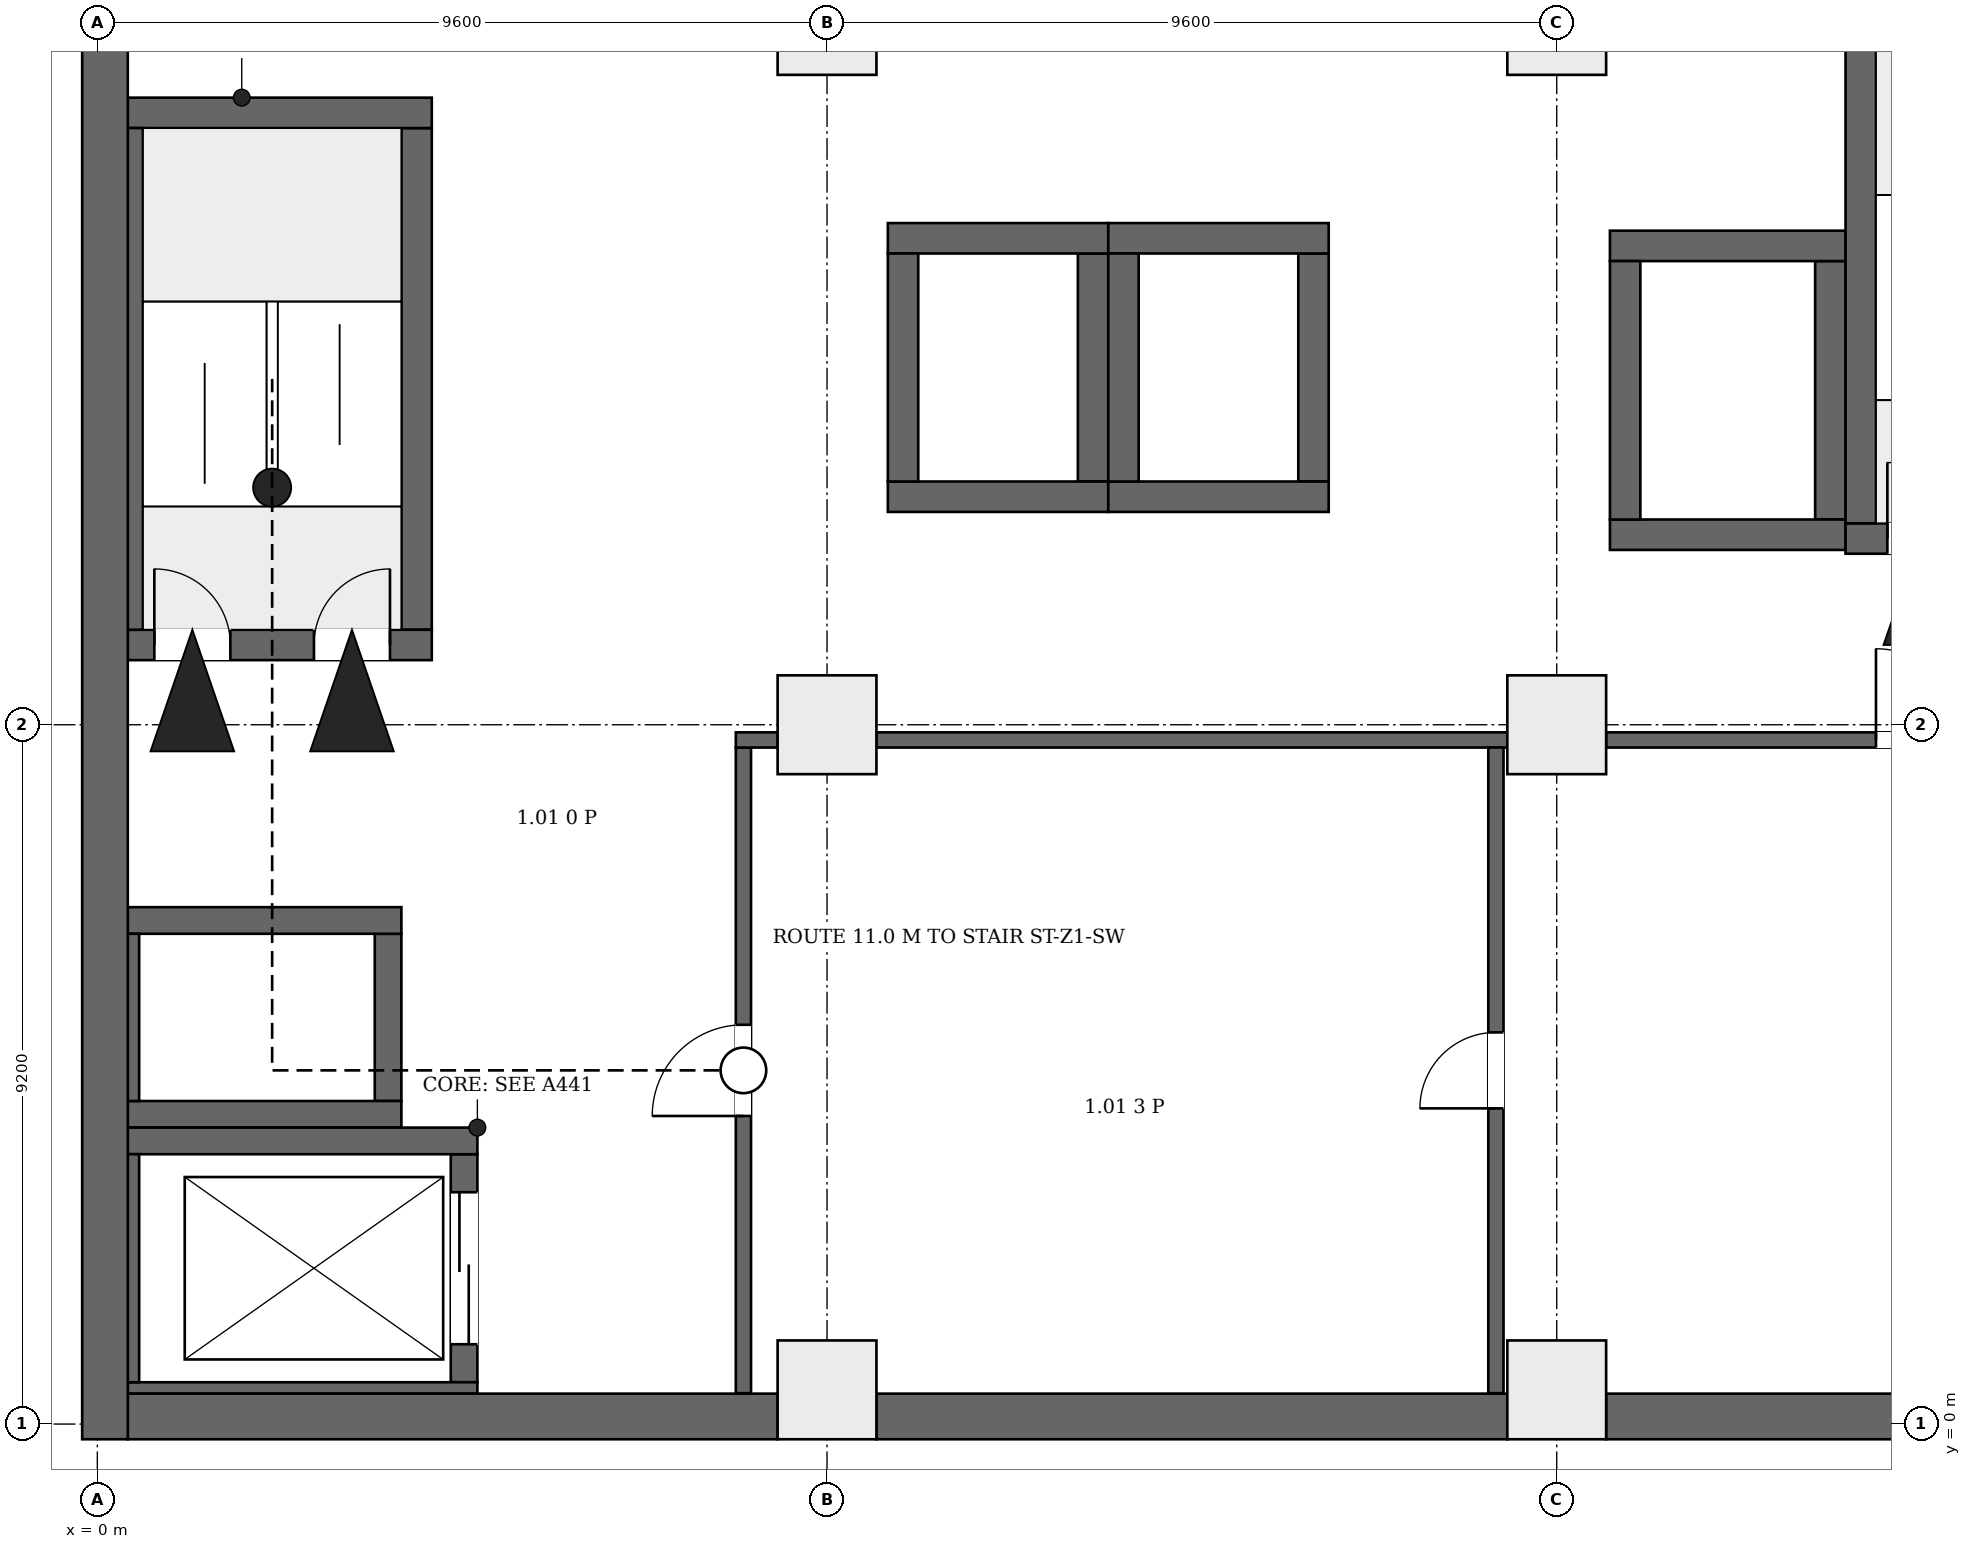
"""IFC4 building model, lengths in metres.
Left out: names, types, materials, properties, quantities, classifications, styles, units other than length and angle.
Written with IfcOpenShell. Run it as: python <this file> out.ifc"""

import sys

from ifc_helpers import new_model, si_unit, direction, frame, frame_2d, origin, origin_2d, place, context, subcontext, project, spatial, rectangle, extrude, element, fill, save


model = new_model("IFC4")
c1 = context("Model", 3, precision=1e-05, world=origin(), true_north=direction((0.0, 1.0)))
c2 = subcontext(c1, "Body", "Model", "MODEL_VIEW")
j1 = project(units=[si_unit("LENGTHUNIT", "METRE"), si_unit("PLANEANGLEUNIT", "RADIAN")], contexts=[c1])
p1 = place(None, origin())
s1 = spatial("IfcSite", under=j1, at=p1, CompositionType="ELEMENT")
p2 = place(p1, origin())
s2 = spatial("IfcBuilding", under=s1, at=p2, CompositionType="ELEMENT")
p3 = place(p2, frame((0.0, 0.0, -5.5)))
s3 = spatial("IfcBuildingStorey", under=s2, at=p3, CompositionType="ELEMENT", Elevation=-5.5)
p4 = place(p3, frame((0.101, -0.2, 0.0), z_axis=(0.0, 0.0, 1.0), x_axis=(0.0, 1.0, 0.0)))
e1 = element("IfcWall", 1, at=p4, inside=s3, PredefinedType="SOLIDWALL", context=c2, shape_type="SweptSolid", body=[
    extrude(rectangle(XDim=46.88, YDim=0.6, at=frame_2d((23.44, 0.0))), origin(), (0.0, 0.0, 1.0), 5.5),
])
p5 = place(p3, frame((0.4, 0.1, 0.0), z_axis=(0.0, 0.0, 1.0), x_axis=(1.0, 0.0, 0.0)))
e2 = element("IfcWall", 2, at=p5, inside=s3, PredefinedType="SOLIDWALL", context=c2, shape_type="SweptSolid", body=[
    extrude(rectangle(XDim=8.55, YDim=0.6, at=frame_2d((4.275, 0.0))), origin(), (0.0, 0.0, 1.0), 5.5),
])
p6 = place(p3, frame((10.25, 0.1, 0.0), z_axis=(0.0, 0.0, 1.0), x_axis=(1.0, 0.0, 0.0)))
e3 = element("IfcWall", 3, at=p6, inside=s3, PredefinedType="SOLIDWALL", context=c2, shape_type="SweptSolid", body=[
    extrude(rectangle(XDim=8.3, YDim=0.6, at=frame_2d((4.15, 0.0))), origin(), (0.0, 0.0, 1.0), 5.5),
])
p7 = place(p3, frame((19.85, 0.1, 0.0), z_axis=(0.0, 0.0, 1.0), x_axis=(1.0, 0.0, 0.0)))
e4 = element("IfcWall", 4, at=p7, inside=s3, PredefinedType="SOLIDWALL", context=c2, shape_type="SweptSolid", body=[
    extrude(rectangle(XDim=8.3, YDim=0.6, at=frame_2d((4.15, 0.0))), origin(), (0.0, 0.0, 1.0), 5.5),
])
p8 = place(p3, frame((0.4, 10.25, 0.0), z_axis=(0.0, 0.0, 1.0), x_axis=(1.0, 0.0, 0.0)))
e5 = element("IfcWall", 5, at=p8, inside=s3, PredefinedType="SHEAR", context=c2, shape_type="SweptSolid", body=[
    extrude(rectangle(XDim=4.0, YDim=0.4, at=frame_2d((2.0, 0.0))), origin(), (0.0, 0.0, 1.0), 5.5),
])
p9 = place(p8, frame((0.35, 0.0, 0.0)))
e6 = element("IfcOpeningElement", 6, at=p9, cuts=e5, PredefinedType="OPENING", context=c2, shape_type="SweptSolid", body=[
    extrude(rectangle(XDim=1.0, YDim=2.1, at=frame_2d((0.5, 1.05))), frame((0.0, 0.21, 0.0), z_axis=(0.0, -1.0, 0.0), x_axis=(1.0, 0.0, 0.0)), (0.0, 0.0, 1.0), 0.42),
])
p10 = place(p8, frame((2.45, 0.0, 0.0)))
e7 = element("IfcOpeningElement", 7, at=p10, cuts=e5, PredefinedType="OPENING", context=c2, shape_type="SweptSolid", body=[
    extrude(rectangle(XDim=1.0, YDim=2.1, at=frame_2d((0.5, 1.05))), frame((0.0, 0.21, 0.0), z_axis=(0.0, -1.0, 0.0), x_axis=(1.0, 0.0, 0.0)), (0.0, 0.0, 1.0), 0.42),
])
p11 = place(p3, frame((0.4, 17.25, 0.0), z_axis=(0.0, 0.0, 1.0), x_axis=(1.0, 0.0, 0.0)))
e8 = element("IfcWall", 8, at=p11, inside=s3, PredefinedType="SHEAR", context=c2, shape_type="SweptSolid", body=[
    extrude(rectangle(XDim=4.0, YDim=0.4, at=frame_2d((2.0, 0.0))), origin(), (0.0, 0.0, 1.0), 5.5),
])
p12 = place(p3, frame((0.5, 10.45, 0.0), z_axis=(0.0, 0.0, 1.0), x_axis=(0.0, 1.0, 0.0)))
e9 = element("IfcWall", 9, at=p12, inside=s3, PredefinedType="SHEAR", context=c2, shape_type="SweptSolid", body=[
    extrude(rectangle(XDim=6.6, YDim=0.2, at=frame_2d((3.3, 0.0))), origin(), (0.0, 0.0, 1.0), 5.5),
])
p13 = place(p3, frame((4.2, 10.45, 0.0), z_axis=(0.0, 0.0, 1.0), x_axis=(0.0, 1.0, 0.0)))
e10 = element("IfcWall", 10, at=p13, inside=s3, PredefinedType="SHEAR", context=c2, shape_type="SweptSolid", body=[
    extrude(rectangle(XDim=6.6, YDim=0.4, at=frame_2d((3.3, 0.0))), origin(), (0.0, 0.0, 1.0), 5.5),
])
p14 = place(p3, frame((23.0, 11.65, 0.0), z_axis=(0.0, 0.0, 1.0), x_axis=(1.0, 0.0, 0.0)))
e11 = element("IfcWall", 11, at=p14, inside=s3, PredefinedType="SHEAR", context=c2, shape_type="SweptSolid", body=[
    extrude(rectangle(XDim=4.2, YDim=0.4, at=frame_2d((2.1, 0.0))), origin(), (0.0, 0.0, 1.0), 5.5),
])
p15 = place(p14, frame((0.55, 0.0, 0.0)))
e12 = element("IfcOpeningElement", 12, at=p15, cuts=e11, PredefinedType="OPENING", context=c2, shape_type="SweptSolid", body=[
    extrude(rectangle(XDim=1.0, YDim=2.1, at=frame_2d((0.5, 1.05))), frame((0.0, 0.21, 0.0), z_axis=(0.0, -1.0, 0.0), x_axis=(1.0, 0.0, 0.0)), (0.0, 0.0, 1.0), 0.42),
])
p16 = place(p14, frame((2.65, 0.0, 0.0)))
e13 = element("IfcOpeningElement", 13, at=p16, cuts=e11, PredefinedType="OPENING", context=c2, shape_type="SweptSolid", body=[
    extrude(rectangle(XDim=1.0, YDim=2.1, at=frame_2d((0.5, 1.05))), frame((0.0, 0.21, 0.0), z_axis=(0.0, -1.0, 0.0), x_axis=(1.0, 0.0, 0.0)), (0.0, 0.0, 1.0), 0.42),
])
p17 = place(p3, frame((23.2, 11.85, 0.0), z_axis=(0.0, 0.0, 1.0), x_axis=(0.0, 1.0, 0.0)))
e14 = element("IfcWall", 14, at=p17, inside=s3, PredefinedType="SHEAR", context=c2, shape_type="SweptSolid", body=[
    extrude(rectangle(XDim=6.6, YDim=0.4, at=frame_2d((3.3, 0.0))), origin(), (0.0, 0.0, 1.0), 5.5),
])
p18 = place(p3, frame((0.4, 0.475, -1.6), z_axis=(0.0, 0.0, 1.0), x_axis=(1.0, 0.0, 0.0)))
e15 = element("IfcWall", 15, at=p18, inside=s3, PredefinedType="SHEAR", context=c2, shape_type="SweptSolid", body=[
    extrude(rectangle(XDim=4.6, YDim=0.15, at=frame_2d((2.3, 0.0))), origin(), (0.0, 0.0, 1.0), 7.1),
])
p19 = place(p3, frame((0.4, 3.725, -1.6), z_axis=(0.0, 0.0, 1.0), x_axis=(1.0, 0.0, 0.0)))
e16 = element("IfcWall", 16, at=p19, inside=s3, PredefinedType="SHEAR", context=c2, shape_type="SweptSolid", body=[
    extrude(rectangle(XDim=4.6, YDim=0.35, at=frame_2d((2.3, 0.0))), origin(), (0.0, 0.0, 1.0), 7.1),
])
p20 = place(p3, frame((0.475, 0.55, -1.6), z_axis=(0.0, 0.0, 1.0), x_axis=(0.0, 1.0, 0.0)))
e17 = element("IfcWall", 17, at=p20, inside=s3, PredefinedType="SHEAR", context=c2, shape_type="SweptSolid", body=[
    extrude(rectangle(XDim=3.0, YDim=0.15, at=frame_2d((1.5, 0.0))), origin(), (0.0, 0.0, 1.0), 7.1),
])
p21 = place(p3, frame((4.825, 0.55, -1.6), z_axis=(0.0, 0.0, 1.0), x_axis=(0.0, 1.0, 0.0)))
e18 = element("IfcWall", 18, at=p21, inside=s3, PredefinedType="SHEAR", context=c2, shape_type="SweptSolid", body=[
    extrude(rectangle(XDim=3.0, YDim=0.35, at=frame_2d((1.5, 0.0))), origin(), (0.0, 0.0, 1.0), 7.1),
])
p22 = place(p21, frame((0.5, 0.0, 1.6)))
e19 = element("IfcOpeningElement", 19, at=p22, cuts=e18, PredefinedType="OPENING", context=c2, shape_type="SweptSolid", body=[
    extrude(rectangle(XDim=2.0, YDim=2.4, at=frame_2d((1.0, 1.2))), frame((0.0, 0.185, 0.0), z_axis=(0.0, -1.0, 0.0), x_axis=(1.0, 0.0, 0.0)), (0.0, 0.0, 1.0), 0.37),
])
for number, where, z_axis, x_axis in (
    (20, (0.4, 4.075, 0.0), (0.0, 0.0, 1.0), (1.0, 0.0, 0.0)),
    (21, (0.4, 6.625, 0.0), (0.0, 0.0, 1.0), (1.0, 0.0, 0.0)),
):
    element("IfcWall", number, at=place(p3, frame(where, z_axis=z_axis, x_axis=x_axis)), inside=s3, PredefinedType="SHEAR", context=c2, shape_type="SweptSolid", body=[
        extrude(rectangle(XDim=3.6, YDim=0.35, at=frame_2d((1.8, 0.0))), origin(), (0.0, 0.0, 1.0), 5.5),
    ])
p23 = place(p3, frame((0.475, 4.25, 0.0), z_axis=(0.0, 0.0, 1.0), x_axis=(0.0, 1.0, 0.0)))
e22 = element("IfcWall", 22, at=p23, inside=s3, PredefinedType="SHEAR", context=c2, shape_type="SweptSolid", body=[
    extrude(rectangle(XDim=2.2, YDim=0.15, at=frame_2d((1.1, 0.0))), origin(), (0.0, 0.0, 1.0), 5.5),
])
p24 = place(p3, frame((3.825, 4.25, 0.0), z_axis=(0.0, 0.0, 1.0), x_axis=(0.0, 1.0, 0.0)))
e23 = element("IfcWall", 23, at=p24, inside=s3, PredefinedType="SHEAR", context=c2, shape_type="SweptSolid", body=[
    extrude(rectangle(XDim=2.2, YDim=0.35, at=frame_2d((1.1, 0.0))), origin(), (0.0, 0.0, 1.0), 5.5),
])
for number, where, z_axis, x_axis in (
    (24, (10.4, 12.2, 0.0), (0.0, 0.0, 1.0), (1.0, 0.0, 0.0)),
    (25, (10.4, 15.6, 0.0), (0.0, 0.0, 1.0), (1.0, 0.0, 0.0)),
):
    element("IfcWall", number, at=place(p3, frame(where, z_axis=z_axis, x_axis=x_axis)), inside=s3, PredefinedType="SHEAR", context=c2, shape_type="SweptSolid", body=[
        extrude(rectangle(XDim=2.9, YDim=0.4, at=frame_2d((1.45, 0.0))), origin(), (0.0, 0.0, 1.0), 5.5),
    ])
for number, where, z_axis, x_axis in (
    (26, (10.6, 12.4, 0.0), (0.0, 0.0, 1.0), (0.0, 1.0, 0.0)),
    (27, (13.1, 12.4, 0.0), (0.0, 0.0, 1.0), (0.0, 1.0, 0.0)),
):
    element("IfcWall", number, at=place(p3, frame(where, z_axis=z_axis, x_axis=x_axis)), inside=s3, PredefinedType="SHEAR", context=c2, shape_type="SweptSolid", body=[
        extrude(rectangle(XDim=3.0, YDim=0.4, at=frame_2d((1.5, 0.0))), origin(), (0.0, 0.0, 1.0), 5.5),
    ])
for number, where, z_axis, x_axis in (
    (28, (13.3, 12.2, 0.0), (0.0, 0.0, 1.0), (1.0, 0.0, 0.0)),
    (29, (13.3, 15.6, 0.0), (0.0, 0.0, 1.0), (1.0, 0.0, 0.0)),
):
    element("IfcWall", number, at=place(p3, frame(where, z_axis=z_axis, x_axis=x_axis)), inside=s3, PredefinedType="SHEAR", context=c2, shape_type="SweptSolid", body=[
        extrude(rectangle(XDim=2.9, YDim=0.4, at=frame_2d((1.45, 0.0))), origin(), (0.0, 0.0, 1.0), 5.5),
    ])
for number, where, z_axis, x_axis in (
    (30, (13.5, 12.4, 0.0), (0.0, 0.0, 1.0), (0.0, 1.0, 0.0)),
    (31, (16.0, 12.4, 0.0), (0.0, 0.0, 1.0), (0.0, 1.0, 0.0)),
):
    element("IfcWall", number, at=place(p3, frame(where, z_axis=z_axis, x_axis=x_axis)), inside=s3, PredefinedType="SHEAR", context=c2, shape_type="SweptSolid", body=[
        extrude(rectangle(XDim=3.0, YDim=0.4, at=frame_2d((1.5, 0.0))), origin(), (0.0, 0.0, 1.0), 5.5),
    ])
for number, where, z_axis, x_axis in (
    (32, (19.9, 11.7, 0.0), (0.0, 0.0, 1.0), (1.0, 0.0, 0.0)),
    (33, (19.9, 15.5, 0.0), (0.0, 0.0, 1.0), (1.0, 0.0, 0.0)),
):
    element("IfcWall", number, at=place(p3, frame(where, z_axis=z_axis, x_axis=x_axis)), inside=s3, PredefinedType="SHEAR", context=c2, shape_type="SweptSolid", body=[
        extrude(rectangle(XDim=3.1, YDim=0.4, at=frame_2d((1.55, 0.0))), origin(), (0.0, 0.0, 1.0), 5.5),
    ])
for number, where, z_axis, x_axis in (
    (34, (20.1, 11.9, 0.0), (0.0, 0.0, 1.0), (0.0, 1.0, 0.0)),
    (35, (22.8, 11.9, 0.0), (0.0, 0.0, 1.0), (0.0, 1.0, 0.0)),
):
    element("IfcWall", number, at=place(p3, frame(where, z_axis=z_axis, x_axis=x_axis)), inside=s3, PredefinedType="SHEAR", context=c2, shape_type="SweptSolid", body=[
        extrude(rectangle(XDim=3.4, YDim=0.4, at=frame_2d((1.7, 0.0))), origin(), (0.0, 0.0, 1.0), 5.5),
    ])
for number, where, z_axis, x_axis in (
    (36, (9.6, 0.45, 0.0), (0.0, 0.0, 1.0), (1.0, 0.0, 0.0)),
    (37, (19.2, 0.45, 0.0), (0.0, 0.0, 1.0), (1.0, 0.0, 0.0)),
    (38, (9.6, 9.2, 0.0), (0.0, 0.0, 1.0), (1.0, 0.0, 0.0)),
    (39, (19.2, 9.2, 0.0), (0.0, 0.0, 1.0), (1.0, 0.0, 0.0)),
    (40, (9.6, 18.4, 0.0), (0.0, 0.0, 1.0), (1.0, 0.0, 0.0)),
    (41, (19.2, 18.4, 0.0), (0.0, 0.0, 1.0), (1.0, 0.0, 0.0)),
):
    element("IfcColumn", number, at=place(p3, frame(where, z_axis=z_axis, x_axis=x_axis)), inside=s3, PredefinedType="COLUMN", context=c2, shape_type="SweptSolid", body=[
        extrude(rectangle(XDim=1.3, YDim=1.3, at=origin_2d()), origin(), (0.0, 0.0, 1.0), 5.5),
    ])
p25 = place(p3, frame((8.5, 0.406, 0.0), z_axis=(0.0, 0.0, 1.0), x_axis=(0.0, 1.0, 0.0)))
e42 = element("IfcWall", 42, at=p25, inside=s3, PredefinedType="PARTITIONING", context=c2, shape_type="SweptSolid", body=[
    extrude(rectangle(XDim=8.494, YDim=0.2, at=frame_2d((4.247, 0.0))), origin(), (0.0, 0.0, 1.0), 5.15),
])
p26 = place(p25, frame((3.647, 0.0, 0.0)))
e43 = element("IfcOpeningElement", 43, at=p26, cuts=e42, PredefinedType="OPENING", context=c2, shape_type="SweptSolid", body=[
    extrude(rectangle(XDim=1.2, YDim=2.1, at=frame_2d((0.6, 1.05))), frame((0.0, 0.11, 0.0), z_axis=(0.0, -1.0, 0.0), x_axis=(1.0, 0.0, 0.0)), (0.0, 0.0, 1.0), 0.22),
])
p27 = place(p3, frame((8.4, 9.0, 0.0), z_axis=(0.0, 0.0, 1.0), x_axis=(1.0, 0.0, 0.0)))
e44 = element("IfcWall", 44, at=p27, inside=s3, PredefinedType="PARTITIONING", context=c2, shape_type="SweptSolid", body=[
    extrude(rectangle(XDim=0.55, YDim=0.2, at=frame_2d((0.275, 0.0))), origin(), (0.0, 0.0, 1.0), 5.15),
])
p28 = place(p3, frame((10.25, 9.0, 0.0), z_axis=(0.0, 0.0, 1.0), x_axis=(1.0, 0.0, 0.0)))
e45 = element("IfcWall", 45, at=p28, inside=s3, PredefinedType="PARTITIONING", context=c2, shape_type="SweptSolid", body=[
    extrude(rectangle(XDim=8.3, YDim=0.2, at=frame_2d((4.15, 0.0))), origin(), (0.0, 0.0, 1.0), 5.15),
])
p29 = place(p3, frame((18.4, 0.406, 0.0), z_axis=(0.0, 0.0, 1.0), x_axis=(0.0, 1.0, 0.0)))
e46 = element("IfcWall", 46, at=p29, inside=s3, PredefinedType="PARTITIONING", context=c2, shape_type="SweptSolid", body=[
    extrude(rectangle(XDim=8.494, YDim=0.2, at=frame_2d((4.247, 0.0))), origin(), (0.0, 0.0, 1.0), 5.15),
])
p30 = place(p29, frame((3.747, 0.0, 0.0)))
e47 = element("IfcOpeningElement", 47, at=p30, cuts=e46, PredefinedType="OPENING", context=c2, shape_type="SweptSolid", body=[
    extrude(rectangle(XDim=1.0, YDim=2.1, at=frame_2d((0.5, 1.05))), frame((0.0, 0.11, 0.0), z_axis=(0.0, -1.0, 0.0), x_axis=(1.0, 0.0, 0.0)), (0.0, 0.0, 1.0), 0.22),
])
p31 = place(p3, frame((19.85, 9.0, 0.0), z_axis=(0.0, 0.0, 1.0), x_axis=(1.0, 0.0, 0.0)))
e48 = element("IfcWall", 48, at=p31, inside=s3, PredefinedType="PARTITIONING", context=c2, shape_type="SweptSolid", body=[
    extrude(rectangle(XDim=8.3, YDim=0.2, at=frame_2d((4.15, 0.0))), origin(), (0.0, 0.0, 1.0), 5.15),
])
p32 = place(p31, frame((3.55, 0.0, 0.0)))
e49 = element("IfcOpeningElement", 49, at=p32, cuts=e48, PredefinedType="OPENING", context=c2, shape_type="SweptSolid", body=[
    extrude(rectangle(XDim=1.2, YDim=2.1, at=frame_2d((0.6, 1.05))), frame((0.0, 0.11, 0.0), z_axis=(0.0, -1.0, 0.0), x_axis=(1.0, 0.0, 0.0)), (0.0, 0.0, 1.0), 0.22),
])
p33 = place(p9, origin())
e50 = element("IfcDoor", 50, at=p33, inside=s3, OperationType="SINGLE_SWING_RIGHT", PredefinedType="DOOR", context=c2, shape_type="SweptSolid", body=[
    extrude(rectangle(XDim=1.0, YDim=2.1, at=frame_2d((0.5, 1.05))), frame((0.0, 0.025, 0.0), z_axis=(0.0, -1.0, 0.0), x_axis=(1.0, 0.0, 0.0)), (0.0, 0.0, 1.0), 0.05),
])
fill(e6, e50)
p34 = place(p10, origin())
e51 = element("IfcDoor", 51, at=p34, inside=s3, OperationType="SINGLE_SWING_LEFT", PredefinedType="DOOR", context=c2, shape_type="SweptSolid", body=[
    extrude(rectangle(XDim=1.0, YDim=2.1, at=frame_2d((0.5, 1.05))), frame((0.0, 0.025, 0.0), z_axis=(0.0, -1.0, 0.0), x_axis=(1.0, 0.0, 0.0)), (0.0, 0.0, 1.0), 0.05),
])
fill(e7, e51)
p35 = place(p15, origin())
e52 = element("IfcDoor", 52, at=p35, inside=s3, OperationType="SINGLE_SWING_RIGHT", PredefinedType="DOOR", context=c2, shape_type="SweptSolid", body=[
    extrude(rectangle(XDim=1.0, YDim=2.1, at=frame_2d((0.5, 1.05))), frame((0.0, 0.025, 0.0), z_axis=(0.0, -1.0, 0.0), x_axis=(1.0, 0.0, 0.0)), (0.0, 0.0, 1.0), 0.05),
])
fill(e12, e52)
p36 = place(p22, origin())
e53 = element("IfcDoor", 53, at=p36, inside=s3, OperationType="DOUBLE_DOOR_SLIDING", PredefinedType="DOOR", context=c2, shape_type="SweptSolid", body=[
    extrude(rectangle(XDim=2.0, YDim=2.4, at=frame_2d((1.0, 1.2))), frame((0.0, 0.025, 0.0), z_axis=(0.0, -1.0, 0.0), x_axis=(1.0, 0.0, 0.0)), (0.0, 0.0, 1.0), 0.05),
])
fill(e19, e53)
p37 = place(p26, origin())
e54 = element("IfcDoor", 54, at=p37, inside=s3, OperationType="SINGLE_SWING_LEFT", PredefinedType="DOOR", context=c2, shape_type="SweptSolid", body=[
    extrude(rectangle(XDim=1.2, YDim=2.1, at=frame_2d((0.6, 1.05))), frame((0.0, 0.025, 0.0), z_axis=(0.0, -1.0, 0.0), x_axis=(1.0, 0.0, 0.0)), (0.0, 0.0, 1.0), 0.05),
])
fill(e43, e54)
p38 = place(p32, origin())
e55 = element("IfcDoor", 55, at=p38, inside=s3, OperationType="SINGLE_SWING_LEFT", PredefinedType="DOOR", context=c2, shape_type="SweptSolid", body=[
    extrude(rectangle(XDim=1.2, YDim=2.1, at=frame_2d((0.6, 1.05))), frame((0.0, 0.025, 0.0), z_axis=(0.0, -1.0, 0.0), x_axis=(1.0, 0.0, 0.0)), (0.0, 0.0, 1.0), 0.05),
])
fill(e49, e55)
p39 = place(p30, origin())
e56 = element("IfcDoor", 56, at=p39, inside=s3, OperationType="SINGLE_SWING_LEFT", PredefinedType="DOOR", context=c2, shape_type="SweptSolid", body=[
    extrude(rectangle(XDim=1.0, YDim=2.1, at=frame_2d((0.5, 1.05))), frame((0.0, 0.025, 0.0), z_axis=(0.0, -1.0, 0.0), x_axis=(1.0, 0.0, 0.0)), (0.0, 0.0, 1.0), 0.05),
])
fill(e47, e56)
save(model, sys.argv[1])
